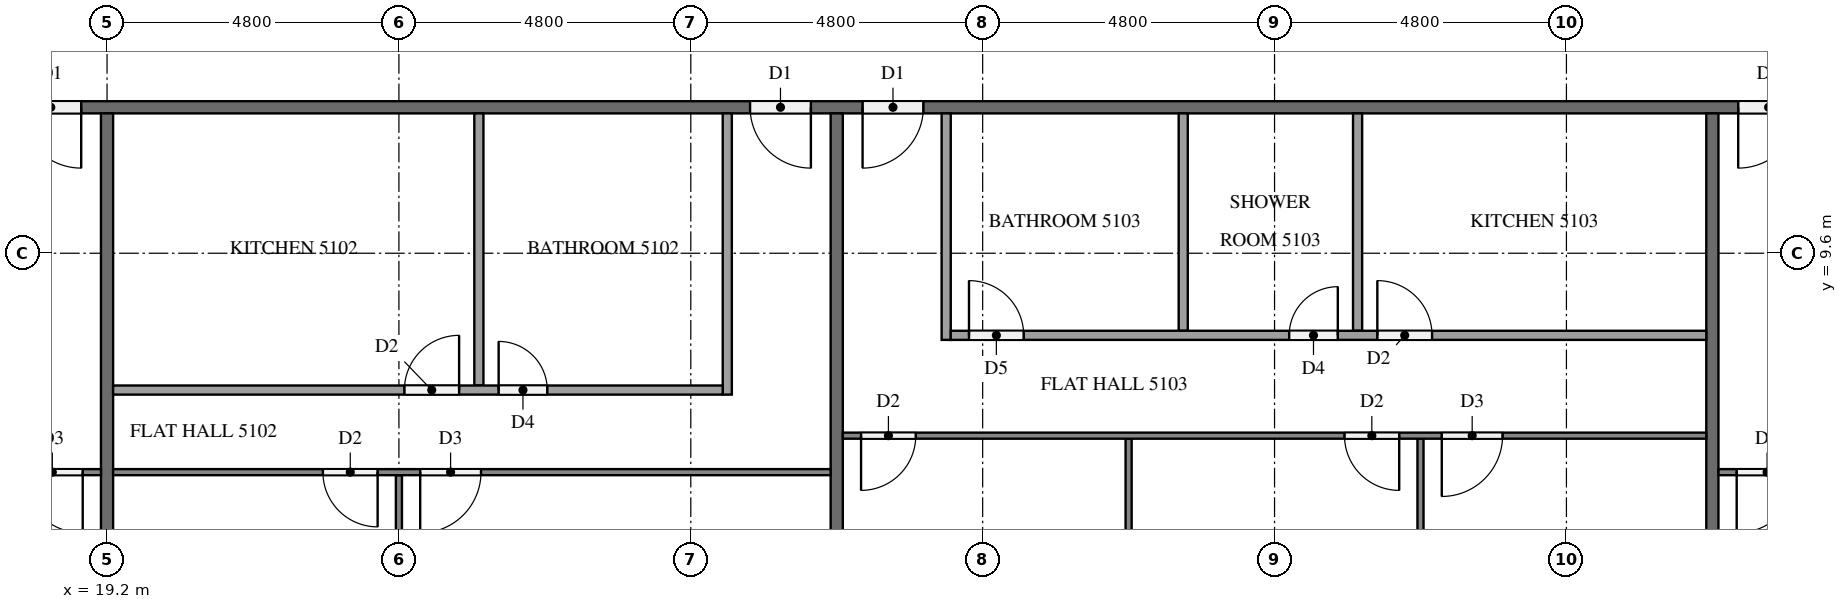
"""IFC4 building model, lengths in metres.
Left out: names, types, materials, properties, quantities, classifications, styles, units other than length and angle.
Written with IfcOpenShell. Run it as: python <this file> out.ifc"""

import sys

from ifc_helpers import new_model, si_unit, direction, frame, frame_2d, origin, place, context, subcontext, project, spatial, rectangle, extrude, element, fill, save


model = new_model("IFC4")
c1 = context("Model", 3, precision=1e-05, world=origin(), true_north=direction((0.0, 1.0)))
c2 = subcontext(c1, "Body", "Model", "MODEL_VIEW")
j1 = project(units=[si_unit("LENGTHUNIT", "METRE"), si_unit("PLANEANGLEUNIT", "RADIAN")], contexts=[c1])
p1 = place(None, origin())
s1 = spatial("IfcSite", under=j1, at=p1, CompositionType="ELEMENT")
p2 = place(p1, origin())
s2 = spatial("IfcBuilding", under=s1, at=p2, CompositionType="ELEMENT")
p3 = place(p2, frame((0.0, 0.0, 196.4)))
s3 = spatial("IfcBuildingStorey", under=s2, at=p3, CompositionType="ELEMENT", Elevation=196.4)
p4 = place(p3, frame((50.5, 12.0, 0.0), z_axis=(0.0, 0.0, 1.0), x_axis=(-1.0, 0.0, 0.0)))
e1 = element("IfcWall", 1, at=p4, inside=s3, PredefinedType="PARTITIONING", context=c2, shape_type="SweptSolid", body=[
    extrude(rectangle(XDim=38.6, YDim=0.2, at=frame_2d((19.3, 0.0))), origin(), (0.0, 0.0, 1.0), 3.2),
])
p5 = place(p4, frame((31.725, 0.0, 0.0)))
e2 = element("IfcOpeningElement", 2, at=p5, cuts=e1, PredefinedType="OPENING", context=c2, shape_type="SweptSolid", body=[
    extrude(rectangle(XDim=1.0, YDim=2.1, at=frame_2d((0.5, 1.05))), frame((0.0, 0.11, 0.0), z_axis=(0.0, -1.0, 0.0), x_axis=(1.0, 0.0, 0.0)), (0.0, 0.0, 1.0), 0.22),
])
p6 = place(p4, frame((19.725, 0.0, 0.0)))
e3 = element("IfcOpeningElement", 3, at=p6, cuts=e1, PredefinedType="OPENING", context=c2, shape_type="SweptSolid", body=[
    extrude(rectangle(XDim=1.0, YDim=2.1, at=frame_2d((0.5, 1.05))), frame((0.0, 0.11, 0.0), z_axis=(0.0, -1.0, 0.0), x_axis=(1.0, 0.0, 0.0)), (0.0, 0.0, 1.0), 0.22),
])
p7 = place(p4, frame((17.875, 0.0, 0.0)))
e4 = element("IfcOpeningElement", 4, at=p7, cuts=e1, PredefinedType="OPENING", context=c2, shape_type="SweptSolid", body=[
    extrude(rectangle(XDim=1.0, YDim=2.1, at=frame_2d((0.5, 1.05))), frame((0.0, 0.11, 0.0), z_axis=(0.0, -1.0, 0.0), x_axis=(1.0, 0.0, 0.0)), (0.0, 0.0, 1.0), 0.22),
])
p8 = place(p4, frame((3.475, 0.0, 0.0)))
e5 = element("IfcOpeningElement", 5, at=p8, cuts=e1, PredefinedType="OPENING", context=c2, shape_type="SweptSolid", body=[
    extrude(rectangle(XDim=1.0, YDim=2.1, at=frame_2d((0.5, 1.05))), frame((0.0, 0.11, 0.0), z_axis=(0.0, -1.0, 0.0), x_axis=(1.0, 0.0, 0.0)), (0.0, 0.0, 1.0), 0.22),
])
p9 = place(p3, frame((19.2, 11.9, 0.0), z_axis=(0.0, 0.0, 1.0), x_axis=(0.0, -1.0, 0.0)))
e6 = element("IfcWall", 6, at=p9, inside=s3, PredefinedType="PARTITIONING", context=c2, shape_type="SweptSolid", body=[
    extrude(rectangle(XDim=11.575, YDim=0.2, at=frame_2d((5.788, 0.0))), origin(), (0.0, 0.0, 1.0), 3.2),
])
for number, where, z_axis, x_axis in (
    (7, (31.2, 11.9, 0.0), (0.0, 0.0, 1.0), (0.0, -1.0, 0.0)),
    (8, (45.6, 11.9, 0.0), (0.0, 0.0, 1.0), (0.0, -1.0, 0.0)),
):
    element("IfcWall", number, at=place(p3, frame(where, z_axis=z_axis, x_axis=x_axis)), inside=s3, PredefinedType="PARTITIONING", context=c2, shape_type="SweptSolid", body=[
        extrude(rectangle(XDim=11.8, YDim=0.2, at=frame_2d((5.9, 0.0))), origin(), (0.0, 0.0, 1.0), 3.2),
    ])
p10 = place(p3, frame((19.1, 6.0, 0.0), z_axis=(0.0, 0.0, 1.0), x_axis=(-1.0, 0.0, 0.0)))
e9 = element("IfcWall", 9, at=p10, inside=s3, PredefinedType="PARTITIONING", context=c2, shape_type="SweptSolid", body=[
    extrude(rectangle(XDim=14.2, YDim=0.1, at=frame_2d((7.1, 0.0))), origin(), (0.0, 0.0, 1.0), 3.2),
])
p11 = place(p10, frame((0.3, 0.0, 0.0)))
e10 = element("IfcOpeningElement", 10, at=p11, cuts=e9, PredefinedType="OPENING", context=c2, shape_type="SweptSolid", body=[
    extrude(rectangle(XDim=1.0, YDim=2.1, at=frame_2d((0.5, 1.05))), frame((0.0, 0.06, 0.0), z_axis=(0.0, -1.0, 0.0), x_axis=(1.0, 0.0, 0.0)), (0.0, 0.0, 1.0), 0.12),
])
p12 = place(p10, frame((8.25, 0.0, 0.0)))
e11 = element("IfcOpeningElement", 11, at=p12, cuts=e9, PredefinedType="OPENING", context=c2, shape_type="SweptSolid", body=[
    extrude(rectangle(XDim=0.9, YDim=2.1, at=frame_2d((0.45, 1.05))), frame((0.0, 0.06, 0.0), z_axis=(0.0, -1.0, 0.0), x_axis=(1.0, 0.0, 0.0)), (0.0, 0.0, 1.0), 0.12),
])
p13 = place(p10, frame((9.85, 0.0, 0.0)))
e12 = element("IfcOpeningElement", 12, at=p13, cuts=e9, PredefinedType="OPENING", context=c2, shape_type="SweptSolid", body=[
    extrude(rectangle(XDim=0.9, YDim=2.1, at=frame_2d((0.45, 1.05))), frame((0.0, 0.06, 0.0), z_axis=(0.0, -1.0, 0.0), x_axis=(1.0, 0.0, 0.0)), (0.0, 0.0, 1.0), 0.12),
])
p14 = place(p3, frame((24.0, 5.95, 0.0), z_axis=(0.0, 0.0, 1.0), x_axis=(0.0, -1.0, 0.0)))
e13 = element("IfcWall", 13, at=p14, inside=s3, PredefinedType="PARTITIONING", context=c2, shape_type="SweptSolid", body=[
    extrude(rectangle(XDim=5.85, YDim=0.1, at=frame_2d((2.925, 0.0))), origin(), (0.0, 0.0, 1.0), 3.2),
])
p15 = place(p3, frame((31.1, 6.0, 0.0), z_axis=(0.0, 0.0, 1.0), x_axis=(-1.0, 0.0, 0.0)))
e14 = element("IfcWall", 14, at=p15, inside=s3, PredefinedType="PARTITIONING", context=c2, shape_type="SweptSolid", body=[
    extrude(rectangle(XDim=11.8, YDim=0.1, at=frame_2d((5.9, 0.0))), origin(), (0.0, 0.0, 1.0), 3.2),
])
p16 = place(p15, frame((5.75, 0.0, 0.0)))
e15 = element("IfcOpeningElement", 15, at=p16, cuts=e14, PredefinedType="OPENING", context=c2, shape_type="SweptSolid", body=[
    extrude(rectangle(XDim=1.0, YDim=2.1, at=frame_2d((0.5, 1.05))), frame((0.0, 0.06, 0.0), z_axis=(0.0, -1.0, 0.0), x_axis=(1.0, 0.0, 0.0)), (0.0, 0.0, 1.0), 0.12),
])
p17 = place(p15, frame((7.45, 0.0, 0.0)))
e16 = element("IfcOpeningElement", 16, at=p17, cuts=e14, PredefinedType="OPENING", context=c2, shape_type="SweptSolid", body=[
    extrude(rectangle(XDim=0.9, YDim=2.1, at=frame_2d((0.45, 1.05))), frame((0.0, 0.06, 0.0), z_axis=(0.0, -1.0, 0.0), x_axis=(1.0, 0.0, 0.0)), (0.0, 0.0, 1.0), 0.12),
])
p18 = place(p3, frame((25.315, 11.9, 0.0), z_axis=(0.0, 0.0, 1.0), x_axis=(0.0, -1.0, 0.0)))
e17 = element("IfcWall", 17, at=p18, inside=s3, PredefinedType="PARTITIONING", context=c2, shape_type="SweptSolid", body=[
    extrude(rectangle(XDim=4.475, YDim=0.15, at=frame_2d((2.237, 0.0))), origin(), (0.0, 0.0, 1.0), 3.2),
])
p19 = place(p3, frame((29.4, 11.9, 0.0), z_axis=(0.0, 0.0, 1.0), x_axis=(0.0, -1.0, 0.0)))
e18 = element("IfcWall", 18, at=p19, inside=s3, PredefinedType="PARTITIONING", context=c2, shape_type="SweptSolid", body=[
    extrude(rectangle(XDim=4.625, YDim=0.15, at=frame_2d((2.312, 0.0))), origin(), (0.0, 0.0, 1.0), 3.2),
])
p20 = place(p3, frame((19.3, 7.35, 0.0), z_axis=(0.0, 0.0, 1.0), x_axis=(1.0, 0.0, 0.0)))
e19 = element("IfcWall", 19, at=p20, inside=s3, PredefinedType="PARTITIONING", context=c2, shape_type="SweptSolid", body=[
    extrude(rectangle(XDim=10.025, YDim=0.15, at=frame_2d((5.012, 0.0))), origin(), (0.0, 0.0, 1.0), 3.2),
])
p21 = place(p20, frame((6.34, 0.0, 0.0)))
e20 = element("IfcOpeningElement", 20, at=p21, cuts=e19, PredefinedType="OPENING", context=c2, shape_type="SweptSolid", body=[
    extrude(rectangle(XDim=0.8, YDim=2.1, at=frame_2d((0.4, 1.05))), frame((0.0, 0.085, 0.0), z_axis=(0.0, -1.0, 0.0), x_axis=(1.0, 0.0, 0.0)), (0.0, 0.0, 1.0), 0.17),
])
p22 = place(p20, frame((4.79, 0.0, 0.0)))
e21 = element("IfcOpeningElement", 21, at=p22, cuts=e19, PredefinedType="OPENING", context=c2, shape_type="SweptSolid", body=[
    extrude(rectangle(XDim=0.9, YDim=2.1, at=frame_2d((0.45, 1.05))), frame((0.0, 0.085, 0.0), z_axis=(0.0, -1.0, 0.0), x_axis=(1.0, 0.0, 0.0)), (0.0, 0.0, 1.0), 0.17),
])
for number, where, z_axis, x_axis in (
    (22, (36.0, 6.55, 0.0), (0.0, 0.0, 1.0), (0.0, -1.0, 0.0)),
    (23, (40.8, 6.55, 0.0), (0.0, 0.0, 1.0), (0.0, -1.0, 0.0)),
):
    element("IfcWall", number, at=place(p3, frame(where, z_axis=z_axis, x_axis=x_axis)), inside=s3, PredefinedType="PARTITIONING", context=c2, shape_type="SweptSolid", body=[
        extrude(rectangle(XDim=6.45, YDim=0.1, at=frame_2d((3.225, 0.0))), origin(), (0.0, 0.0, 1.0), 3.2),
    ])
p23 = place(p3, frame((45.5, 6.6, 0.0), z_axis=(0.0, 0.0, 1.0), x_axis=(-1.0, 0.0, 0.0)))
e24 = element("IfcWall", 24, at=p23, inside=s3, PredefinedType="PARTITIONING", context=c2, shape_type="SweptSolid", body=[
    extrude(rectangle(XDim=14.2, YDim=0.1, at=frame_2d((7.1, 0.0))), origin(), (0.0, 0.0, 1.0), 3.2),
])
p24 = place(p23, frame((13.0, 0.0, 0.0)))
e25 = element("IfcOpeningElement", 25, at=p24, cuts=e24, PredefinedType="OPENING", context=c2, shape_type="SweptSolid", body=[
    extrude(rectangle(XDim=0.9, YDim=2.1, at=frame_2d((0.45, 1.05))), frame((0.0, 0.06, 0.0), z_axis=(0.0, -1.0, 0.0), x_axis=(1.0, 0.0, 0.0)), (0.0, 0.0, 1.0), 0.12),
])
p25 = place(p23, frame((5.05, 0.0, 0.0)))
e26 = element("IfcOpeningElement", 26, at=p25, cuts=e24, PredefinedType="OPENING", context=c2, shape_type="SweptSolid", body=[
    extrude(rectangle(XDim=0.9, YDim=2.1, at=frame_2d((0.45, 1.05))), frame((0.0, 0.06, 0.0), z_axis=(0.0, -1.0, 0.0), x_axis=(1.0, 0.0, 0.0)), (0.0, 0.0, 1.0), 0.12),
])
p26 = place(p23, frame((3.35, 0.0, 0.0)))
e27 = element("IfcOpeningElement", 27, at=p26, cuts=e24, PredefinedType="OPENING", context=c2, shape_type="SweptSolid", body=[
    extrude(rectangle(XDim=1.0, YDim=2.1, at=frame_2d((0.5, 1.05))), frame((0.0, 0.06, 0.0), z_axis=(0.0, -1.0, 0.0), x_axis=(1.0, 0.0, 0.0)), (0.0, 0.0, 1.0), 0.12),
])
for number, where, z_axis, x_axis in (
    (28, (36.898, 11.9, 0.0), (0.0, 0.0, 1.0), (0.0, -1.0, 0.0)),
    (29, (39.765, 11.9, 0.0), (0.0, 0.0, 1.0), (0.0, -1.0, 0.0)),
):
    element("IfcWall", number, at=place(p3, frame(where, z_axis=z_axis, x_axis=x_axis)), inside=s3, PredefinedType="PARTITIONING", context=c2, shape_type="SweptSolid", body=[
        extrude(rectangle(XDim=3.575, YDim=0.15, at=frame_2d((1.788, 0.0))), origin(), (0.0, 0.0, 1.0), 3.2),
    ])
p27 = place(p3, frame((33.0, 11.9, 0.0), z_axis=(0.0, 0.0, 1.0), x_axis=(0.0, -1.0, 0.0)))
e30 = element("IfcWall", 30, at=p27, inside=s3, PredefinedType="PARTITIONING", context=c2, shape_type="SweptSolid", body=[
    extrude(rectangle(XDim=3.725, YDim=0.15, at=frame_2d((1.862, 0.0))), origin(), (0.0, 0.0, 1.0), 3.2),
])
p28 = place(p3, frame((33.075, 8.25, 0.0), z_axis=(0.0, 0.0, 1.0), x_axis=(1.0, 0.0, 0.0)))
e31 = element("IfcWall", 31, at=p28, inside=s3, PredefinedType="PARTITIONING", context=c2, shape_type="SweptSolid", body=[
    extrude(rectangle(XDim=12.425, YDim=0.15, at=frame_2d((6.212, 0.0))), origin(), (0.0, 0.0, 1.0), 3.2),
])
p29 = place(p28, frame((0.3, 0.0, 0.0)))
e32 = element("IfcOpeningElement", 32, at=p29, cuts=e31, PredefinedType="OPENING", context=c2, shape_type="SweptSolid", body=[
    extrude(rectangle(XDim=0.9, YDim=2.1, at=frame_2d((0.45, 1.05))), frame((0.0, 0.085, 0.0), z_axis=(0.0, -1.0, 0.0), x_axis=(1.0, 0.0, 0.0)), (0.0, 0.0, 1.0), 0.17),
])
p30 = place(p28, frame((5.565, 0.0, 0.0)))
e33 = element("IfcOpeningElement", 33, at=p30, cuts=e31, PredefinedType="OPENING", context=c2, shape_type="SweptSolid", body=[
    extrude(rectangle(XDim=0.8, YDim=2.1, at=frame_2d((0.4, 1.05))), frame((0.0, 0.085, 0.0), z_axis=(0.0, -1.0, 0.0), x_axis=(1.0, 0.0, 0.0)), (0.0, 0.0, 1.0), 0.17),
])
p31 = place(p28, frame((7.015, 0.0, 0.0)))
e34 = element("IfcOpeningElement", 34, at=p31, cuts=e31, PredefinedType="OPENING", context=c2, shape_type="SweptSolid", body=[
    extrude(rectangle(XDim=0.9, YDim=2.1, at=frame_2d((0.45, 1.05))), frame((0.0, 0.085, 0.0), z_axis=(0.0, -1.0, 0.0), x_axis=(1.0, 0.0, 0.0)), (0.0, 0.0, 1.0), 0.17),
])
p32 = place(p3, frame((62.3, 6.0, 0.0), z_axis=(0.0, 0.0, 1.0), x_axis=(-1.0, 0.0, 0.0)))
e35 = element("IfcWall", 35, at=p32, inside=s3, PredefinedType="PARTITIONING", context=c2, shape_type="SweptSolid", body=[
    extrude(rectangle(XDim=16.6, YDim=0.1, at=frame_2d((8.3, 0.0))), origin(), (0.0, 0.0, 1.0), 3.2),
])
p33 = place(p32, frame((15.3, 0.0, 0.0)))
e36 = element("IfcOpeningElement", 36, at=p33, cuts=e35, PredefinedType="OPENING", context=c2, shape_type="SweptSolid", body=[
    extrude(rectangle(XDim=1.0, YDim=2.1, at=frame_2d((0.5, 1.05))), frame((0.0, 0.06, 0.0), z_axis=(0.0, -1.0, 0.0), x_axis=(1.0, 0.0, 0.0)), (0.0, 0.0, 1.0), 0.12),
])
p34 = place(p32, frame((5.05, 0.0, 0.0)))
e37 = element("IfcOpeningElement", 37, at=p34, cuts=e35, PredefinedType="OPENING", context=c2, shape_type="SweptSolid", body=[
    extrude(rectangle(XDim=0.9, YDim=2.1, at=frame_2d((0.45, 1.05))), frame((0.0, 0.06, 0.0), z_axis=(0.0, -1.0, 0.0), x_axis=(1.0, 0.0, 0.0)), (0.0, 0.0, 1.0), 0.12),
])
p35 = place(p32, frame((3.45, 0.0, 0.0)))
e38 = element("IfcOpeningElement", 38, at=p35, cuts=e35, PredefinedType="OPENING", context=c2, shape_type="SweptSolid", body=[
    extrude(rectangle(XDim=0.9, YDim=2.1, at=frame_2d((0.45, 1.05))), frame((0.0, 0.06, 0.0), z_axis=(0.0, -1.0, 0.0), x_axis=(1.0, 0.0, 0.0)), (0.0, 0.0, 1.0), 0.12),
])
p36 = place(p5, origin())
e39 = element("IfcDoor", 39, at=p36, inside=s3, OperationType="SINGLE_SWING_LEFT", PredefinedType="DOOR", context=c2, shape_type="SweptSolid", body=[
    extrude(rectangle(XDim=1.0, YDim=2.1, at=frame_2d((0.5, 1.05))), frame((0.0, 0.025, 0.0), z_axis=(0.0, -1.0, 0.0), x_axis=(1.0, 0.0, 0.0)), (0.0, 0.0, 1.0), 0.05),
])
fill(e2, e39)
p37 = place(p6, origin())
e40 = element("IfcDoor", 40, at=p37, inside=s3, OperationType="SINGLE_SWING_LEFT", PredefinedType="DOOR", context=c2, shape_type="SweptSolid", body=[
    extrude(rectangle(XDim=1.0, YDim=2.1, at=frame_2d((0.5, 1.05))), frame((0.0, 0.025, 0.0), z_axis=(0.0, -1.0, 0.0), x_axis=(1.0, 0.0, 0.0)), (0.0, 0.0, 1.0), 0.05),
])
fill(e3, e40)
p38 = place(p7, origin())
e41 = element("IfcDoor", 41, at=p38, inside=s3, OperationType="SINGLE_SWING_RIGHT", PredefinedType="DOOR", context=c2, shape_type="SweptSolid", body=[
    extrude(rectangle(XDim=1.0, YDim=2.1, at=frame_2d((0.5, 1.05))), frame((0.0, 0.025, 0.0), z_axis=(0.0, -1.0, 0.0), x_axis=(1.0, 0.0, 0.0)), (0.0, 0.0, 1.0), 0.05),
])
fill(e4, e41)
p39 = place(p8, origin())
e42 = element("IfcDoor", 42, at=p39, inside=s3, OperationType="SINGLE_SWING_RIGHT", PredefinedType="DOOR", context=c2, shape_type="SweptSolid", body=[
    extrude(rectangle(XDim=1.0, YDim=2.1, at=frame_2d((0.5, 1.05))), frame((0.0, 0.025, 0.0), z_axis=(0.0, -1.0, 0.0), x_axis=(1.0, 0.0, 0.0)), (0.0, 0.0, 1.0), 0.05),
])
fill(e5, e42)
p40 = place(p11, origin())
e43 = element("IfcDoor", 43, at=p40, inside=s3, OperationType="SINGLE_SWING_LEFT", PredefinedType="DOOR", context=c2, shape_type="SweptSolid", body=[
    extrude(rectangle(XDim=1.0, YDim=2.1, at=frame_2d((0.5, 1.05))), frame((0.0, 0.025, 0.0), z_axis=(0.0, -1.0, 0.0), x_axis=(1.0, 0.0, 0.0)), (0.0, 0.0, 1.0), 0.05),
])
fill(e10, e43)
p41 = place(p16, origin())
e44 = element("IfcDoor", 44, at=p41, inside=s3, OperationType="SINGLE_SWING_RIGHT", PredefinedType="DOOR", context=c2, shape_type="SweptSolid", body=[
    extrude(rectangle(XDim=1.0, YDim=2.1, at=frame_2d((0.5, 1.05))), frame((0.0, 0.025, 0.0), z_axis=(0.0, -1.0, 0.0), x_axis=(1.0, 0.0, 0.0)), (0.0, 0.0, 1.0), 0.05),
])
fill(e15, e44)
p42 = place(p17, origin())
e45 = element("IfcDoor", 45, at=p42, inside=s3, OperationType="SINGLE_SWING_LEFT", PredefinedType="DOOR", context=c2, shape_type="SweptSolid", body=[
    extrude(rectangle(XDim=0.9, YDim=2.1, at=frame_2d((0.45, 1.05))), frame((0.0, 0.025, 0.0), z_axis=(0.0, -1.0, 0.0), x_axis=(1.0, 0.0, 0.0)), (0.0, 0.0, 1.0), 0.05),
])
fill(e16, e45)
p43 = place(p21, origin())
e46 = element("IfcDoor", 46, at=p43, inside=s3, OperationType="SINGLE_SWING_LEFT", PredefinedType="DOOR", context=c2, shape_type="SweptSolid", body=[
    extrude(rectangle(XDim=0.8, YDim=2.1, at=frame_2d((0.4, 1.05))), frame((0.0, 0.025, 0.0), z_axis=(0.0, -1.0, 0.0), x_axis=(1.0, 0.0, 0.0)), (0.0, 0.0, 1.0), 0.05),
])
fill(e20, e46)
p44 = place(p22, origin())
e47 = element("IfcDoor", 47, at=p44, inside=s3, OperationType="SINGLE_SWING_RIGHT", PredefinedType="DOOR", context=c2, shape_type="SweptSolid", body=[
    extrude(rectangle(XDim=0.9, YDim=2.1, at=frame_2d((0.45, 1.05))), frame((0.0, 0.025, 0.0), z_axis=(0.0, -1.0, 0.0), x_axis=(1.0, 0.0, 0.0)), (0.0, 0.0, 1.0), 0.05),
])
fill(e21, e47)
p45 = place(p24, origin())
e48 = element("IfcDoor", 48, at=p45, inside=s3, OperationType="SINGLE_SWING_RIGHT", PredefinedType="DOOR", context=c2, shape_type="SweptSolid", body=[
    extrude(rectangle(XDim=0.9, YDim=2.1, at=frame_2d((0.45, 1.05))), frame((0.0, 0.025, 0.0), z_axis=(0.0, -1.0, 0.0), x_axis=(1.0, 0.0, 0.0)), (0.0, 0.0, 1.0), 0.05),
])
fill(e25, e48)
p46 = place(p25, origin())
e49 = element("IfcDoor", 49, at=p46, inside=s3, OperationType="SINGLE_SWING_LEFT", PredefinedType="DOOR", context=c2, shape_type="SweptSolid", body=[
    extrude(rectangle(XDim=0.9, YDim=2.1, at=frame_2d((0.45, 1.05))), frame((0.0, 0.025, 0.0), z_axis=(0.0, -1.0, 0.0), x_axis=(1.0, 0.0, 0.0)), (0.0, 0.0, 1.0), 0.05),
])
fill(e26, e49)
p47 = place(p26, origin())
e50 = element("IfcDoor", 50, at=p47, inside=s3, OperationType="SINGLE_SWING_RIGHT", PredefinedType="DOOR", context=c2, shape_type="SweptSolid", body=[
    extrude(rectangle(XDim=1.0, YDim=2.1, at=frame_2d((0.5, 1.05))), frame((0.0, 0.025, 0.0), z_axis=(0.0, -1.0, 0.0), x_axis=(1.0, 0.0, 0.0)), (0.0, 0.0, 1.0), 0.05),
])
fill(e27, e50)
p48 = place(p29, origin())
e51 = element("IfcDoor", 51, at=p48, inside=s3, OperationType="SINGLE_SWING_LEFT", PredefinedType="DOOR", context=c2, shape_type="SweptSolid", body=[
    extrude(rectangle(XDim=0.9, YDim=2.1, at=frame_2d((0.45, 1.05))), frame((0.0, 0.025, 0.0), z_axis=(0.0, -1.0, 0.0), x_axis=(1.0, 0.0, 0.0)), (0.0, 0.0, 1.0), 0.05),
])
fill(e32, e51)
p49 = place(p30, origin())
e52 = element("IfcDoor", 52, at=p49, inside=s3, OperationType="SINGLE_SWING_RIGHT", PredefinedType="DOOR", context=c2, shape_type="SweptSolid", body=[
    extrude(rectangle(XDim=0.8, YDim=2.1, at=frame_2d((0.4, 1.05))), frame((0.0, 0.025, 0.0), z_axis=(0.0, -1.0, 0.0), x_axis=(1.0, 0.0, 0.0)), (0.0, 0.0, 1.0), 0.05),
])
fill(e33, e52)
p50 = place(p31, origin())
e53 = element("IfcDoor", 53, at=p50, inside=s3, OperationType="SINGLE_SWING_LEFT", PredefinedType="DOOR", context=c2, shape_type="SweptSolid", body=[
    extrude(rectangle(XDim=0.9, YDim=2.1, at=frame_2d((0.45, 1.05))), frame((0.0, 0.025, 0.0), z_axis=(0.0, -1.0, 0.0), x_axis=(1.0, 0.0, 0.0)), (0.0, 0.0, 1.0), 0.05),
])
fill(e34, e53)
p51 = place(p33, origin())
e54 = element("IfcDoor", 54, at=p51, inside=s3, OperationType="SINGLE_SWING_RIGHT", PredefinedType="DOOR", context=c2, shape_type="SweptSolid", body=[
    extrude(rectangle(XDim=1.0, YDim=2.1, at=frame_2d((0.5, 1.05))), frame((0.0, 0.025, 0.0), z_axis=(0.0, -1.0, 0.0), x_axis=(1.0, 0.0, 0.0)), (0.0, 0.0, 1.0), 0.05),
])
fill(e36, e54)
save(model, sys.argv[1])
